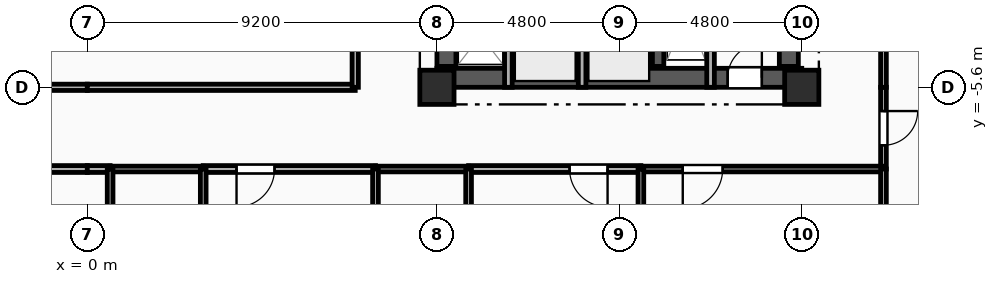
"""IFC4 building model, lengths in metres.
Left out: names, types, materials, properties, quantities, classifications, styles, units other than length and angle.
Written with IfcOpenShell. Run it as: python <this file> out.ifc"""

import sys

from ifc_helpers import new_model, si_unit, direction, frame, frame_2d, origin, origin_2d, place, context, subcontext, project, spatial, rectangle, extrude, element, fill, save


model = new_model("IFC4")
c1 = context("Model", 3, precision=1e-05, world=origin(), true_north=direction((0.0, 1.0)))
c2 = subcontext(c1, "Body", "Model", "MODEL_VIEW")
j1 = project(units=[si_unit("LENGTHUNIT", "METRE"), si_unit("PLANEANGLEUNIT", "RADIAN")], contexts=[c1])
p1 = place(None, origin())
s1 = spatial("IfcSite", under=j1, at=p1, CompositionType="ELEMENT")
p2 = place(p1, origin())
s2 = spatial("IfcBuilding", under=s1, at=p2, CompositionType="ELEMENT")
p3 = place(p2, frame((0.0, 0.0, 144.4)))
s3 = spatial("IfcBuildingStorey", under=s2, at=p3, CompositionType="ELEMENT", Elevation=144.4)
for number, where, z_axis, x_axis in (
    (1, (9.2, -5.6, 0.0), (0.0, 0.0, 1.0), (1.0, 0.0, 0.0)),
    (2, (18.8, -5.6, 0.0), (0.0, 0.0, 1.0), (1.0, 0.0, 0.0)),
):
    element("IfcColumn", number, at=place(p3, frame(where, z_axis=z_axis, x_axis=x_axis)), inside=s3, PredefinedType="COLUMN", context=c2, shape_type="SweptSolid", body=[
        extrude(rectangle(XDim=0.9, YDim=0.9, at=origin_2d()), origin(), (0.0, 0.0, 1.0), 3.35),
    ])
p4 = place(p3, frame((9.2, -5.35, 0.0), z_axis=(0.0, 0.0, 1.0), x_axis=(1.0, 0.0, 0.0)))
e3 = element("IfcWall", 3, at=p4, inside=s3, PredefinedType="SHEAR", context=c2, shape_type="SweptSolid", body=[
    extrude(rectangle(XDim=9.6, YDim=0.5, at=frame_2d((4.8, 0.0))), origin(), (0.0, 0.0, 1.0), 3.04),
])
p5 = place(p4, frame((7.65, 0.0, 0.0)))
e4 = element("IfcOpeningElement", 4, at=p5, cuts=e3, PredefinedType="OPENING", context=c2, shape_type="SweptSolid", body=[
    extrude(rectangle(XDim=0.9, YDim=2.1, at=frame_2d((0.45, 1.05))), frame((0.0, 0.26, 0.0), z_axis=(0.0, -1.0, 0.0), x_axis=(1.0, 0.0, 0.0)), (0.0, 0.0, 1.0), 0.52),
])
p6 = place(p3, frame((9.45, -5.05, 0.0), z_axis=(0.0, 0.0, 1.0), x_axis=(0.0, 1.0, 0.0)))
e5 = element("IfcWall", 5, at=p6, inside=s3, PredefinedType="SHEAR", context=c2, shape_type="SweptSolid", body=[
    extrude(rectangle(XDim=10.1, YDim=0.5, at=frame_2d((5.05, 0.0))), origin(), (0.0, 0.0, 1.0), 3.04),
])
p7 = place(p6, frame((7.15, 0.0, 0.0)))
e6 = element("IfcOpeningElement", 6, at=p7, cuts=e5, PredefinedType="OPENING", context=c2, shape_type="SweptSolid", body=[
    extrude(rectangle(XDim=0.9, YDim=2.1, at=frame_2d((0.45, 1.05))), frame((0.0, 0.26, 0.0), z_axis=(0.0, -1.0, 0.0), x_axis=(1.0, 0.0, 0.0)), (0.0, 0.0, 1.0), 0.52),
])
p8 = place(p6, frame((2.4, 0.0, 0.0)))
e7 = element("IfcOpeningElement", 7, at=p8, cuts=e5, PredefinedType="OPENING", context=c2, shape_type="SweptSolid", body=[
    extrude(rectangle(XDim=1.2, YDim=2.15, at=frame_2d((0.6, 1.075))), frame((0.0, 0.26, 0.0), z_axis=(0.0, -1.0, 0.0), x_axis=(1.0, 0.0, 0.0)), (0.0, 0.0, 1.0), 0.52),
])
p9 = place(p3, frame((18.46, -5.05, 0.0), z_axis=(0.0, 0.0, 1.0), x_axis=(0.0, 1.0, 0.0)))
e8 = element("IfcWall", 8, at=p9, inside=s3, PredefinedType="SHEAR", context=c2, shape_type="SweptSolid", body=[
    extrude(rectangle(XDim=10.1, YDim=0.5, at=frame_2d((5.05, 0.0))), origin(), (0.0, 0.0, 1.0), 3.04),
])
p10 = place(p3, frame((15.02, -5.05, 0.0), z_axis=(0.0, 0.0, 1.0), x_axis=(0.0, 1.0, 0.0)))
e9 = element("IfcWall", 9, at=p10, inside=s3, PredefinedType="SHEAR", context=c2, shape_type="SweptSolid", body=[
    extrude(rectangle(XDim=10.1, YDim=0.3, at=frame_2d((5.05, 0.0))), origin(), (0.0, 0.0, 1.0), 3.04),
])
p11 = place(p3, frame((16.4, -2.11, 0.0), z_axis=(0.0, 0.0, 1.0), x_axis=(0.0, -1.0, 0.0)))
e10 = element("IfcWall", 10, at=p11, inside=s3, PredefinedType="PARTITIONING", context=c2, shape_type="SweptSolid", body=[
    extrude(rectangle(XDim=3.49, YDim=0.2, at=frame_2d((1.745, 0.0))), origin(), (0.0, 0.0, 1.0), 3.04),
])
for number, where, z_axis, x_axis in (
    (11, (11.08, -5.6, 0.0), (0.0, 0.0, 1.0), (0.0, 1.0, 0.0)),
    (12, (13.02, -5.6, 0.0), (0.0, 0.0, 1.0), (0.0, 1.0, 0.0)),
):
    element("IfcWall", number, at=place(p3, frame(where, z_axis=z_axis, x_axis=x_axis)), inside=s3, PredefinedType="PARTITIONING", context=c2, shape_type="SweptSolid", body=[
        extrude(rectangle(XDim=2.25, YDim=0.2, at=frame_2d((1.125, 0.0))), origin(), (0.0, 0.0, 1.0), 3.04),
    ])
p12 = place(p3, frame((0.0, -7.75, 0.0), z_axis=(0.0, 0.0, 1.0), x_axis=(-1.0, 0.0, 0.0)))
e13 = element("IfcWall", 13, at=p12, inside=s3, PredefinedType="PARTITIONING", context=c2, shape_type="SweptSolid", body=[
    extrude(rectangle(XDim=3.933, YDim=0.18, at=frame_2d((1.967, 0.0))), origin(), (0.0, 0.0, 1.0), 3.04),
])
p13 = place(p12, frame((1.467, 0.0, 0.0)))
e14 = element("IfcOpeningElement", 14, at=p13, cuts=e13, PredefinedType="OPENING", context=c2, shape_type="SweptSolid", body=[
    extrude(rectangle(XDim=1.0, YDim=2.15, at=frame_2d((0.5, 1.075))), frame((0.0, 0.1, 0.0), z_axis=(0.0, -1.0, 0.0), x_axis=(1.0, 0.0, 0.0)), (0.0, 0.0, 1.0), 0.2),
])
p14 = place(p3, frame((-7.05, -5.6, 0.0), z_axis=(0.0, 0.0, 1.0), x_axis=(1.0, 0.0, 0.0)))
e15 = element("IfcWall", 15, at=p14, inside=s3, PredefinedType="PARTITIONING", context=c2, shape_type="SweptSolid", body=[
    extrude(rectangle(XDim=7.05, YDim=0.165, at=frame_2d((3.525, 0.0))), origin(), (0.0, 0.0, 1.0), 2.525),
])
p15 = place(p3, frame((20.95, -5.6, 0.0), z_axis=(0.0, 0.0, 1.0), x_axis=(0.0, -1.0, 0.0)))
e16 = element("IfcWall", 16, at=p15, inside=s3, PredefinedType="PARTITIONING", context=c2, shape_type="SweptSolid", body=[
    extrude(rectangle(XDim=2.15, YDim=0.15, at=frame_2d((1.075, 0.0))), origin(), (0.0, 0.0, 1.0), 3.04),
])
p16 = place(p15, frame((0.625, 0.0, 0.0)))
e17 = element("IfcOpeningElement", 17, at=p16, cuts=e16, PredefinedType="OPENING", context=c2, shape_type="SweptSolid", body=[
    extrude(rectangle(XDim=0.9, YDim=2.1, at=frame_2d((0.45, 1.05))), frame((0.0, 0.085, 0.0), z_axis=(0.0, -1.0, 0.0), x_axis=(1.0, 0.0, 0.0)), (0.0, 0.0, 1.0), 0.17),
])
p17 = place(p3, frame((0.6, -7.75, 0.0), z_axis=(0.0, 0.0, 1.0), x_axis=(-1.0, 0.0, 0.0)))
e18 = element("IfcWall", 18, at=p17, inside=s3, PredefinedType="PARTITIONING", context=c2, shape_type="SweptSolid", body=[
    extrude(rectangle(XDim=0.6, YDim=0.18, at=frame_2d((0.3, 0.0))), origin(), (0.0, 0.0, 1.0), 3.04),
])
p18 = place(p3, frame((7.583, -7.75, 0.0), z_axis=(0.0, 0.0, 1.0), x_axis=(-1.0, 0.0, 0.0)))
e19 = element("IfcWall", 19, at=p18, inside=s3, PredefinedType="PARTITIONING", context=c2, shape_type="SweptSolid", body=[
    extrude(rectangle(XDim=4.533, YDim=0.18, at=frame_2d((2.267, 0.0))), origin(), (0.0, 0.0, 1.0), 3.04),
])
p19 = place(p18, frame((2.656, 0.0, 0.0)))
e20 = element("IfcOpeningElement", 20, at=p19, cuts=e19, PredefinedType="OPENING", context=c2, shape_type="SweptSolid", body=[
    extrude(rectangle(XDim=1.0, YDim=2.15, at=frame_2d((0.5, 1.075))), frame((0.0, 0.1, 0.0), z_axis=(0.0, -1.0, 0.0), x_axis=(1.0, 0.0, 0.0)), (0.0, 0.0, 1.0), 0.2),
])
p20 = place(p3, frame((3.05, -7.75, 0.0), z_axis=(0.0, 0.0, 1.0), x_axis=(-1.0, 0.0, 0.0)))
e21 = element("IfcWall", 21, at=p20, inside=s3, PredefinedType="PLUMBINGWALL", context=c2, shape_type="SweptSolid", body=[
    extrude(rectangle(XDim=2.45, YDim=0.15, at=frame_2d((1.225, 0.0))), origin(), (0.0, 0.0, 1.0), 3.04),
])
p21 = place(p3, frame((14.567, -7.75, 0.0), z_axis=(0.0, 0.0, 1.0), x_axis=(-1.0, 0.0, 0.0)))
e22 = element("IfcWall", 22, at=p21, inside=s3, PredefinedType="PARTITIONING", context=c2, shape_type="SweptSolid", body=[
    extrude(rectangle(XDim=4.534, YDim=0.18, at=frame_2d((2.267, 0.0))), origin(), (0.0, 0.0, 1.0), 3.04),
])
p22 = place(p21, frame((0.877, 0.0, 0.0)))
e23 = element("IfcOpeningElement", 23, at=p22, cuts=e22, PredefinedType="OPENING", context=c2, shape_type="SweptSolid", body=[
    extrude(rectangle(XDim=1.0, YDim=2.15, at=frame_2d((0.5, 1.075))), frame((0.0, 0.1, 0.0), z_axis=(0.0, -1.0, 0.0), x_axis=(1.0, 0.0, 0.0)), (0.0, 0.0, 1.0), 0.2),
])
p23 = place(p3, frame((10.033, -7.75, 0.0), z_axis=(0.0, 0.0, 1.0), x_axis=(-1.0, 0.0, 0.0)))
e24 = element("IfcWall", 24, at=p23, inside=s3, PredefinedType="PLUMBINGWALL", context=c2, shape_type="SweptSolid", body=[
    extrude(rectangle(XDim=2.45, YDim=0.15, at=frame_2d((1.225, 0.0))), origin(), (0.0, 0.0, 1.0), 3.04),
])
p24 = place(p3, frame((20.95, -7.75, 0.0), z_axis=(0.0, 0.0, 1.0), x_axis=(-1.0, 0.0, 0.0)))
e25 = element("IfcWall", 25, at=p24, inside=s3, PredefinedType="PARTITIONING", context=c2, shape_type="SweptSolid", body=[
    extrude(rectangle(XDim=6.383, YDim=0.15, at=frame_2d((3.191, 0.0))), origin(), (0.0, 0.0, 1.0), 3.04),
])
p25 = place(p24, frame((4.231, 0.0, 0.0)))
e26 = element("IfcOpeningElement", 26, at=p25, cuts=e25, PredefinedType="OPENING", context=c2, shape_type="SweptSolid", body=[
    extrude(rectangle(XDim=1.05, YDim=2.15, at=frame_2d((0.525, 1.075))), frame((0.0, 0.085, 0.0), z_axis=(0.0, -1.0, 0.0), x_axis=(1.0, 0.0, 0.0)), (0.0, 0.0, 1.0), 0.17),
])
p26 = place(p3, frame((0.0, -5.6, 0.0), z_axis=(0.0, 0.0, 1.0), x_axis=(1.0, 0.0, 0.0)))
e27 = element("IfcWall", 27, at=p26, inside=s3, PredefinedType="PARTITIONING", context=c2, shape_type="SweptSolid", body=[
    extrude(rectangle(XDim=7.05, YDim=0.165, at=frame_2d((3.525, 0.0))), origin(), (0.0, 0.0, 1.0), 2.525),
])
p27 = place(p3, frame((20.95, -3.46, 0.0), z_axis=(0.0, 0.0, 1.0), x_axis=(0.0, -1.0, 0.0)))
e28 = element("IfcWall", 28, at=p27, inside=s3, PredefinedType="PARTITIONING", context=c2, shape_type="SweptSolid", body=[
    extrude(rectangle(XDim=2.14, YDim=0.15, at=frame_2d((1.07, 0.0))), origin(), (0.0, 0.0, 1.0), 3.04),
])
p28 = place(p3, frame((7.05, -5.6, 0.0), z_axis=(0.0, 0.0, 1.0), x_axis=(0.0, 1.0, 0.0)))
e29 = element("IfcWall", 29, at=p28, inside=s3, PredefinedType="PARTITIONING", context=c2, shape_type="SweptSolid", body=[
    extrude(rectangle(XDim=2.65, YDim=0.165, at=frame_2d((1.325, 0.0))), origin(), (0.0, 0.0, 1.0), 3.04),
])
p29 = place(p3, frame((20.95, -15.6, 0.0), z_axis=(0.0, 0.0, 1.0), x_axis=(0.0, 1.0, 0.0)))
e30 = element("IfcWall", 30, at=p29, inside=s3, PredefinedType="PARTITIONING", context=c2, shape_type="SweptSolid", body=[
    extrude(rectangle(XDim=7.85, YDim=0.15, at=frame_2d((3.925, 0.0))), origin(), (0.0, 0.0, 1.0), 3.04),
])
for number, where, z_axis, x_axis in (
    (31, (0.6, -7.75, 0.0), (0.0, 0.0, 1.0), (0.0, -1.0, 0.0)),
    (32, (3.05, -9.9, 0.0), (0.0, 0.0, 1.0), (0.0, 1.0, 0.0)),
    (33, (7.583, -7.75, 0.0), (0.0, 0.0, 1.0), (0.0, -1.0, 0.0)),
    (34, (10.033, -9.9, 0.0), (0.0, 0.0, 1.0), (0.0, 1.0, 0.0)),
):
    element("IfcWall", number, at=place(p3, frame(where, z_axis=z_axis, x_axis=x_axis)), inside=s3, PredefinedType="PLUMBINGWALL", context=c2, shape_type="SweptSolid", body=[
        extrude(rectangle(XDim=2.15, YDim=0.15, at=frame_2d((1.075, 0.0))), origin(), (0.0, 0.0, 1.0), 3.04),
    ])
p30 = place(p3, frame((14.567, -7.75, 0.0), z_axis=(0.0, 0.0, 1.0), x_axis=(0.0, -1.0, 0.0)))
e35 = element("IfcWall", 35, at=p30, inside=s3, PredefinedType="PARTITIONING", context=c2, shape_type="SweptSolid", body=[
    extrude(rectangle(XDim=7.85, YDim=0.15, at=frame_2d((3.925, 0.0))), origin(), (0.0, 0.0, 1.0), 3.04),
])
p31 = place(p5, origin())
e36 = element("IfcDoor", 36, at=p31, inside=s3, OperationType="SINGLE_SWING_RIGHT", PredefinedType="DOOR", context=c2, shape_type="SweptSolid", body=[
    extrude(rectangle(XDim=0.9, YDim=2.1, at=frame_2d((0.45, 1.05))), frame((0.0, 0.025, 0.0), z_axis=(0.0, -1.0, 0.0), x_axis=(1.0, 0.0, 0.0)), (0.0, 0.0, 1.0), 0.05),
])
fill(e4, e36)
p32 = place(p16, origin())
e37 = element("IfcDoor", 37, at=p32, inside=s3, OperationType="SINGLE_SWING_LEFT", PredefinedType="DOOR", context=c2, shape_type="SweptSolid", body=[
    extrude(rectangle(XDim=0.9, YDim=2.1, at=frame_2d((0.45, 1.05))), frame((0.0, 0.025, 0.0), z_axis=(0.0, -1.0, 0.0), x_axis=(1.0, 0.0, 0.0)), (0.0, 0.0, 1.0), 0.05),
])
fill(e17, e37)
p33 = place(p19, origin())
e38 = element("IfcDoor", 38, at=p33, inside=s3, OperationType="SINGLE_SWING_RIGHT", PredefinedType="DOOR", context=c2, shape_type="SweptSolid", body=[
    extrude(rectangle(XDim=1.0, YDim=2.15, at=frame_2d((0.5, 1.075))), frame((0.0, 0.025, 0.0), z_axis=(0.0, -1.0, 0.0), x_axis=(1.0, 0.0, 0.0)), (0.0, 0.0, 1.0), 0.05),
])
fill(e20, e38)
p34 = place(p22, origin())
e39 = element("IfcDoor", 39, at=p34, inside=s3, OperationType="SINGLE_SWING_LEFT", PredefinedType="DOOR", context=c2, shape_type="SweptSolid", body=[
    extrude(rectangle(XDim=1.0, YDim=2.15, at=frame_2d((0.5, 1.075))), frame((0.0, 0.025, 0.0), z_axis=(0.0, -1.0, 0.0), x_axis=(1.0, 0.0, 0.0)), (0.0, 0.0, 1.0), 0.05),
])
fill(e23, e39)
p35 = place(p25, origin())
e40 = element("IfcDoor", 40, at=p35, inside=s3, OperationType="SINGLE_SWING_RIGHT", PredefinedType="DOOR", context=c2, shape_type="SweptSolid", body=[
    extrude(rectangle(XDim=1.05, YDim=2.15, at=frame_2d((0.525, 1.075))), frame((0.0, 0.025, 0.0), z_axis=(0.0, -1.0, 0.0), x_axis=(1.0, 0.0, 0.0)), (0.0, 0.0, 1.0), 0.05),
])
fill(e26, e40)
save(model, sys.argv[1])
